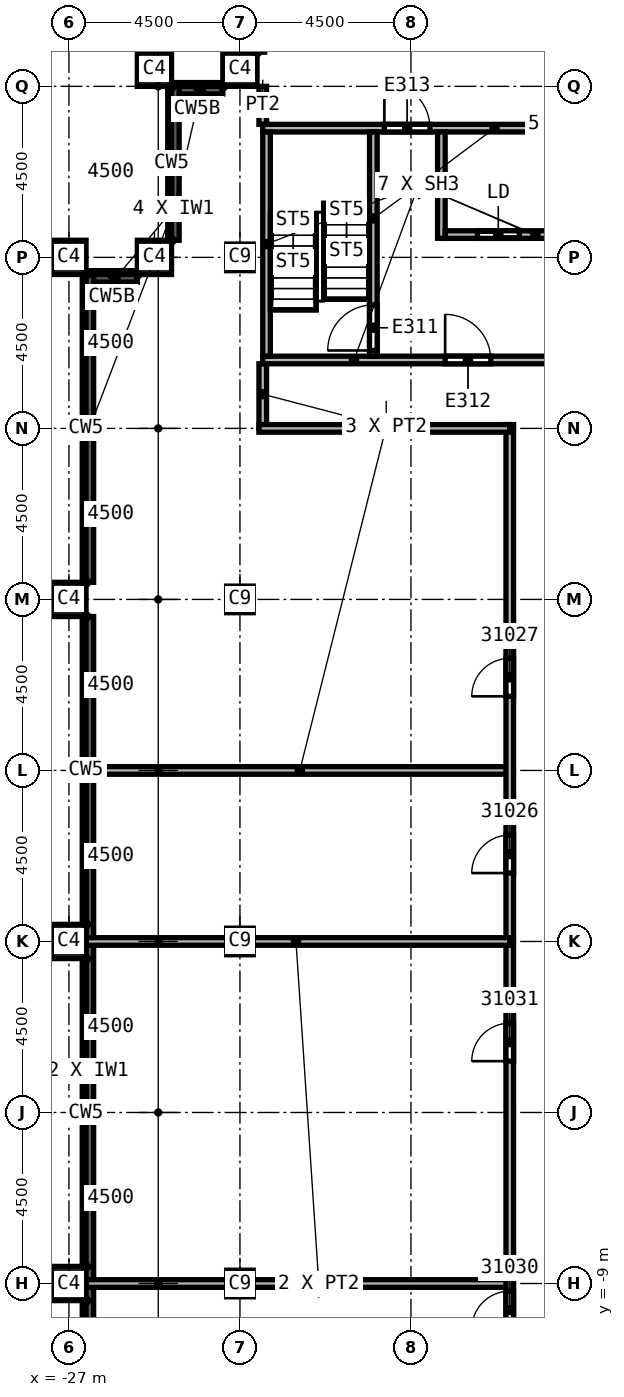
"""IFC4 building model, lengths in metres.
Left out: names, types, materials, properties, quantities, classifications, styles, units other than length and angle.
Written with IfcOpenShell. Run it as: python <this file> out.ifc"""

import sys

from ifc_helpers import new_model, si_unit, direction, frame, frame_2d, origin, origin_2d, place, context, subcontext, project, spatial, rectangle, extrude, element, fill, save


model = new_model("IFC4")
c1 = context("Model", 3, precision=1e-05, world=origin(), true_north=direction((0.0, 1.0)))
c2 = subcontext(c1, "Body", "Model", "MODEL_VIEW")
j1 = project(units=[si_unit("LENGTHUNIT", "METRE"), si_unit("PLANEANGLEUNIT", "RADIAN")], contexts=[c1])
p1 = place(None, origin())
s1 = spatial("IfcSite", under=j1, at=p1, CompositionType="ELEMENT")
p2 = place(p1, origin())
s2 = spatial("IfcBuilding", under=s1, at=p2, CompositionType="ELEMENT")
p3 = place(p2, frame((0.0, 0.0, 350.0)))
s3 = spatial("IfcBuildingStorey", under=s2, at=p3, CompositionType="ELEMENT", Elevation=350.0)
for number, where, z_axis, x_axis in (
    (1, (-22.5, 0.0, 0.0), (0.0, 0.0, 1.0), (1.0, 0.0, 0.0)),
    (2, (-22.5, 9.0, 0.0), (0.0, 0.0, 1.0), (1.0, 0.0, 0.0)),
    (3, (-22.5, 18.0, 0.0), (0.0, 0.0, 1.0), (1.0, 0.0, 0.0)),
    (4, (-22.5, -9.0, 0.0), (0.0, 0.0, 1.0), (1.0, 0.0, 0.0)),
):
    element("IfcColumn", number, at=place(p3, frame(where, z_axis=z_axis, x_axis=x_axis)), inside=s3, PredefinedType="COLUMN", context=c2, shape_type="SweptSolid", body=[
        extrude(rectangle(XDim=0.7, YDim=0.7, at=origin_2d()), origin(), (0.0, 0.0, 1.0), 5.6),
    ])
for number, where, z_axis, x_axis in (
    (5, (-27.0, 0.0, 0.0), (0.0, 0.0, 1.0), (0.0, 1.0, 0.0)),
    (6, (-27.0, 9.0, 0.0), (0.0, 0.0, 1.0), (0.0, 1.0, 0.0)),
    (7, (-27.0, 18.0, 0.0), (0.0, 0.0, 1.0), (0.0, 1.0, 0.0)),
    (8, (-27.0, -9.0, 0.0), (0.0, 0.0, 1.0), (0.0, 1.0, 0.0)),
    (9, (-22.5, 22.95, 0.0), (0.0, 0.0, 1.0), (1.0, 0.0, 0.0)),
    (10, (-24.75, 22.95, 0.0), (0.0, 0.0, 1.0), (1.0, 0.0, 0.0)),
    (11, (-24.75, 18.0, 0.0), (0.0, 0.0, 1.0), (1.0, 0.0, 0.0)),
):
    element("IfcColumn", number, at=place(p3, frame(where, z_axis=z_axis, x_axis=x_axis)), inside=s3, PredefinedType="COLUMN", context=c2, shape_type="SweptSolid", body=[
        extrude(rectangle(XDim=0.9, YDim=0.9, at=origin_2d()), origin(), (0.0, 0.0, 1.0), 5.6),
    ])
p4 = place(p3, frame((-25.2, 17.5, 0.0), z_axis=(0.0, 0.0, 1.0), x_axis=(-1.0, 0.0, 0.0)))
e12 = element("IfcWall", 12, at=p4, inside=s3, PredefinedType="SOLIDWALL", context=c2, shape_type="SweptSolid", body=[
    extrude(rectangle(XDim=1.35, YDim=0.3, at=frame_2d((0.675, 0.0))), origin(), (0.0, 0.0, 1.0), 1.1),
])
p5 = place(p3, frame((-26.5, 17.55, 0.0), z_axis=(0.0, 0.0, 1.0), x_axis=(0.0, -1.0, 0.0)))
e13 = element("IfcWall", 13, at=p5, inside=s3, PredefinedType="SOLIDWALL", context=c2, shape_type="SweptSolid", body=[
    extrude(rectangle(XDim=8.1, YDim=0.3, at=frame_2d((4.05, 0.0))), origin(), (0.0, 0.0, 1.0), 1.1),
])
p6 = place(p3, frame((-26.5, 8.55, 0.0), z_axis=(0.0, 0.0, 1.0), x_axis=(0.0, -1.0, 0.0)))
e14 = element("IfcWall", 14, at=p6, inside=s3, PredefinedType="SOLIDWALL", context=c2, shape_type="SweptSolid", body=[
    extrude(rectangle(XDim=8.5, YDim=0.3, at=frame_2d((4.25, 0.0))), origin(), (0.0, 0.0, 1.0), 1.1),
])
p7 = place(p3, frame((-26.5, -0.05, 0.0), z_axis=(0.0, 0.0, 1.0), x_axis=(0.0, -1.0, 0.0)))
e15 = element("IfcWall", 15, at=p7, inside=s3, PredefinedType="SOLIDWALL", context=c2, shape_type="SweptSolid", body=[
    extrude(rectangle(XDim=8.9, YDim=0.3, at=frame_2d((4.45, 0.0))), origin(), (0.0, 0.0, 1.0), 1.1),
])
p8 = place(p3, frame((-26.5, -9.05, 0.0), z_axis=(0.0, 0.0, 1.0), x_axis=(0.0, -1.0, 0.0)))
e16 = element("IfcWall", 16, at=p8, inside=s3, PredefinedType="SOLIDWALL", context=c2, shape_type="SweptSolid", body=[
    extrude(rectangle(XDim=8.5, YDim=0.3, at=frame_2d((4.25, 0.0))), origin(), (0.0, 0.0, 1.0), 1.1),
])
p9 = place(p3, frame((-22.95, 22.45, 0.0), z_axis=(0.0, 0.0, 1.0), x_axis=(-1.0, 0.0, 0.0)))
e17 = element("IfcWall", 17, at=p9, inside=s3, PredefinedType="SOLIDWALL", context=c2, shape_type="SweptSolid", body=[
    extrude(rectangle(XDim=1.35, YDim=0.3, at=frame_2d((0.675, 0.0))), origin(), (0.0, 0.0, 1.0), 1.1),
])
p10 = place(p3, frame((-24.25, 22.5, 0.0), z_axis=(0.0, 0.0, 1.0), x_axis=(0.0, -1.0, 0.0)))
e18 = element("IfcWall", 18, at=p10, inside=s3, PredefinedType="SOLIDWALL", context=c2, shape_type="SweptSolid", body=[
    extrude(rectangle(XDim=4.05, YDim=0.3, at=frame_2d((2.025, 0.0))), origin(), (0.0, 0.0, 1.0), 1.1),
])
p11 = place(p3, frame((-26.55, -9.0, 0.0), z_axis=(0.0, 0.0, 1.0), x_axis=(1.0, 0.0, 0.0)))
e19 = element("IfcWall", 19, at=p11, inside=s3, PredefinedType="PARTITIONING", context=c2, shape_type="SweptSolid", body=[
    extrude(rectangle(XDim=11.15, YDim=0.2, at=frame_2d((5.575, 0.0))), origin(), (0.0, 0.0, 1.0), 5.6),
])
p12 = place(p3, frame((-26.35, 4.5, 0.0), z_axis=(0.0, 0.0, 1.0), x_axis=(1.0, 0.0, 0.0)))
e20 = element("IfcWall", 20, at=p12, inside=s3, PredefinedType="PARTITIONING", context=c2, shape_type="SweptSolid", body=[
    extrude(rectangle(XDim=10.95, YDim=0.2, at=frame_2d((5.475, 0.0))), origin(), (0.0, 0.0, 1.0), 5.6),
])
p13 = place(p3, frame((-21.9, 13.5, 0.0), z_axis=(0.0, 0.0, 1.0), x_axis=(0.0, 1.0, 0.0)))
e21 = element("IfcWall", 21, at=p13, inside=s3, PredefinedType="PARTITIONING", context=c2, shape_type="SweptSolid", body=[
    extrude(rectangle(XDim=1.7, YDim=0.2, at=frame_2d((0.85, 0.0))), origin(), (0.0, 0.0, 1.0), 5.6),
])
p14 = place(p3, frame((-21.9, 21.5, 0.0), z_axis=(0.0, 0.0, 1.0), x_axis=(0.0, 1.0, 0.0)))
e22 = element("IfcWall", 22, at=p14, inside=s3, PredefinedType="PARTITIONING", context=c2, shape_type="SweptSolid", body=[
    extrude(rectangle(XDim=1.0, YDim=0.2, at=frame_2d((0.5, 0.0))), origin(), (0.0, 0.0, 1.0), 5.6),
])
p15 = place(p3, frame((-15.4, -27.25, 0.0), z_axis=(0.0, 0.0, 1.0), x_axis=(0.0, 1.0, 0.0)))
e23 = element("IfcWall", 23, at=p15, inside=s3, PredefinedType="PARTITIONING", context=c2, shape_type="SweptSolid", body=[
    extrude(rectangle(XDim=40.85, YDim=0.2, at=frame_2d((20.425, 0.0))), origin(), (0.0, 0.0, 1.0), 5.6),
])
p16 = place(p15, frame((29.05, 0.0, 0.0)))
e24 = element("IfcOpeningElement", 24, at=p16, cuts=e23, PredefinedType="OPENING", context=c2, shape_type="SweptSolid", body=[
    extrude(rectangle(XDim=1.0, YDim=2.1, at=frame_2d((0.5, 1.05))), frame((0.0, 0.1, 0.0), z_axis=(0.0, -1.0, 0.0), x_axis=(1.0, 0.0, 0.0)), (0.0, 0.0, 1.0), 0.2),
])
p17 = place(p15, frame((33.7, 0.0, 0.0)))
e25 = element("IfcOpeningElement", 25, at=p17, cuts=e23, PredefinedType="OPENING", context=c2, shape_type="SweptSolid", body=[
    extrude(rectangle(XDim=1.0, YDim=2.1, at=frame_2d((0.5, 1.05))), frame((0.0, 0.1, 0.0), z_axis=(0.0, -1.0, 0.0), x_axis=(1.0, 0.0, 0.0)), (0.0, 0.0, 1.0), 0.2),
])
p18 = place(p15, frame((1.3, 0.0, 0.0)))
e26 = element("IfcOpeningElement", 26, at=p18, cuts=e23, PredefinedType="OPENING", context=c2, shape_type="SweptSolid", body=[
    extrude(rectangle(XDim=1.0, YDim=2.1, at=frame_2d((0.5, 1.05))), frame((0.0, 0.1, 0.0), z_axis=(0.0, -1.0, 0.0), x_axis=(1.0, 0.0, 0.0)), (0.0, 0.0, 1.0), 0.2),
])
p19 = place(p15, frame((7.15, 0.0, 0.0)))
e27 = element("IfcOpeningElement", 27, at=p19, cuts=e23, PredefinedType="OPENING", context=c2, shape_type="SweptSolid", body=[
    extrude(rectangle(XDim=1.0, YDim=2.1, at=frame_2d((0.5, 1.05))), frame((0.0, 0.1, 0.0), z_axis=(0.0, -1.0, 0.0), x_axis=(1.0, 0.0, 0.0)), (0.0, 0.0, 1.0), 0.2),
])
p20 = place(p15, frame((17.05, 0.0, 0.0)))
e28 = element("IfcOpeningElement", 28, at=p20, cuts=e23, PredefinedType="OPENING", context=c2, shape_type="SweptSolid", body=[
    extrude(rectangle(XDim=1.0, YDim=2.1, at=frame_2d((0.5, 1.05))), frame((0.0, 0.1, 0.0), z_axis=(0.0, -1.0, 0.0), x_axis=(1.0, 0.0, 0.0)), (0.0, 0.0, 1.0), 0.2),
])
p21 = place(p15, frame((24.1, 0.0, 0.0)))
e29 = element("IfcOpeningElement", 29, at=p21, cuts=e23, PredefinedType="OPENING", context=c2, shape_type="SweptSolid", body=[
    extrude(rectangle(XDim=1.0, YDim=2.1, at=frame_2d((0.5, 1.05))), frame((0.0, 0.1, 0.0), z_axis=(0.0, -1.0, 0.0), x_axis=(1.0, 0.0, 0.0)), (0.0, 0.0, 1.0), 0.2),
])
p22 = place(p3, frame((-15.4, 0.0, 0.0), z_axis=(0.0, 0.0, 1.0), x_axis=(-1.0, 0.0, 0.0)))
e30 = element("IfcWall", 30, at=p22, inside=s3, PredefinedType="PARTITIONING", context=c2, shape_type="SweptSolid", body=[
    extrude(rectangle(XDim=11.15, YDim=0.2, at=frame_2d((5.575, 0.0))), origin(), (0.0, 0.0, 1.0), 5.6),
])
p23 = place(p3, frame((-15.4, 13.5, 0.0), z_axis=(0.0, 0.0, 1.0), x_axis=(-1.0, 0.0, 0.0)))
e31 = element("IfcWall", 31, at=p23, inside=s3, PredefinedType="PARTITIONING", context=c2, shape_type="SweptSolid", body=[
    extrude(rectangle(XDim=6.6, YDim=0.2, at=frame_2d((3.3, 0.0))), origin(), (0.0, 0.0, 1.0), 5.6),
])
p24 = place(p3, frame((-21.9, 15.3, 0.0), z_axis=(0.0, 0.0, 1.0), x_axis=(1.0, 0.0, 0.0)))
e32 = element("IfcWall", 32, at=p24, inside=s3, PredefinedType="SOLIDWALL", context=c2, shape_type="SweptSolid", body=[
    extrude(rectangle(XDim=8.275, YDim=0.2, at=frame_2d((4.137, 0.0))), origin(), (0.0, 0.0, 1.0), 5.6),
])
p25 = place(p24, frame((4.8, 0.0, 0.0)))
e33 = element("IfcOpeningElement", 33, at=p25, cuts=e32, PredefinedType="OPENING", context=c2, shape_type="SweptSolid", body=[
    extrude(rectangle(XDim=1.2, YDim=2.1, at=frame_2d((0.6, 1.05))), frame((0.0, 0.1, 0.0), z_axis=(0.0, -1.0, 0.0), x_axis=(1.0, 0.0, 0.0)), (0.0, 0.0, 1.0), 0.2),
])
p26 = place(p3, frame((-21.9, 21.4, 0.0), z_axis=(0.0, 0.0, 1.0), x_axis=(1.0, 0.0, 0.0)))
e34 = element("IfcWall", 34, at=p26, inside=s3, PredefinedType="SOLIDWALL", context=c2, shape_type="SweptSolid", body=[
    extrude(rectangle(XDim=7.8, YDim=0.2, at=frame_2d((3.9, 0.0))), origin(), (0.0, 0.0, 1.0), 5.6),
])
p27 = place(p26, frame((3.2, 0.0, 0.0)))
e35 = element("IfcOpeningElement", 35, at=p27, cuts=e34, PredefinedType="OPENING", context=c2, shape_type="SweptSolid", body=[
    extrude(rectangle(XDim=1.2, YDim=2.1, at=frame_2d((0.6, 1.05))), frame((0.0, 0.1, 0.0), z_axis=(0.0, -1.0, 0.0), x_axis=(1.0, 0.0, 0.0)), (0.0, 0.0, 1.0), 0.2),
])
p28 = place(p3, frame((-21.8, 15.4, 0.0), z_axis=(0.0, 0.0, 1.0), x_axis=(0.0, 1.0, 0.0)))
e36 = element("IfcWall", 36, at=p28, inside=s3, PredefinedType="SOLIDWALL", context=c2, shape_type="SweptSolid", body=[
    extrude(rectangle(XDim=5.9, YDim=0.2, at=frame_2d((2.95, 0.0))), origin(), (0.0, 0.0, 1.0), 5.6),
])
p29 = place(p3, frame((-18.99, 15.4, 0.0), z_axis=(0.0, 0.0, 1.0), x_axis=(0.0, 1.0, 0.0)))
e37 = element("IfcWall", 37, at=p29, inside=s3, PredefinedType="SOLIDWALL", context=c2, shape_type="SweptSolid", body=[
    extrude(rectangle(XDim=5.9, YDim=0.2, at=frame_2d((2.95, 0.0))), origin(), (0.0, 0.0, 1.0), 5.6),
])
p30 = place(p29, frame((0.15, 0.0, 0.0)))
e38 = element("IfcOpeningElement", 38, at=p30, cuts=e37, PredefinedType="OPENING", context=c2, shape_type="SweptSolid", body=[
    extrude(rectangle(XDim=1.2, YDim=2.1, at=frame_2d((0.6, 1.05))), frame((0.0, 0.1, 0.0), z_axis=(0.0, -1.0, 0.0), x_axis=(1.0, 0.0, 0.0)), (0.0, 0.0, 1.0), 0.2),
])
p31 = place(p3, frame((-17.2, 18.5, 0.0), z_axis=(0.0, 0.0, 1.0), x_axis=(0.0, 1.0, 0.0)))
e39 = element("IfcWall", 39, at=p31, inside=s3, PredefinedType="SOLIDWALL", context=c2, shape_type="SweptSolid", body=[
    extrude(rectangle(XDim=2.8, YDim=0.2, at=frame_2d((1.4, 0.0))), origin(), (0.0, 0.0, 1.0), 5.6),
])
p32 = place(p3, frame((-17.1, 18.6, 0.0), z_axis=(0.0, 0.0, 1.0), x_axis=(1.0, 0.0, 0.0)))
e40 = element("IfcWall", 40, at=p32, inside=s3, PredefinedType="SOLIDWALL", context=c2, shape_type="SweptSolid", body=[
    extrude(rectangle(XDim=2.8, YDim=0.2, at=frame_2d((1.4, 0.0))), origin(), (0.0, 0.0, 1.0), 5.6),
])
p33 = place(p32, frame((0.85, 0.0, 0.0)))
e41 = element("IfcOpeningElement", 41, at=p33, cuts=e40, PredefinedType="OPENING", context=c2, shape_type="SweptSolid", body=[
    extrude(rectangle(XDim=1.1, YDim=2.1, at=frame_2d((0.55, 1.05))), frame((0.0, 0.1, 0.0), z_axis=(0.0, -1.0, 0.0), x_axis=(1.0, 0.0, 0.0)), (0.0, 0.0, 1.0), 0.2),
])
p34 = place(p16, origin())
e42 = element("IfcDoor", 42, at=p34, inside=s3, OperationType="SINGLE_SWING_LEFT", PredefinedType="DOOR", context=c2, shape_type="SweptSolid", body=[
    extrude(rectangle(XDim=1.0, YDim=2.1, at=frame_2d((0.5, 1.05))), frame((0.0, 0.025, 0.0), z_axis=(0.0, -1.0, 0.0), x_axis=(1.0, 0.0, 0.0)), (0.0, 0.0, 1.0), 0.05),
])
fill(e24, e42)
p35 = place(p17, origin())
e43 = element("IfcDoor", 43, at=p35, inside=s3, OperationType="SINGLE_SWING_RIGHT", PredefinedType="DOOR", context=c2, shape_type="SweptSolid", body=[
    extrude(rectangle(XDim=1.0, YDim=2.1, at=frame_2d((0.5, 1.05))), frame((0.0, 0.025, 0.0), z_axis=(0.0, -1.0, 0.0), x_axis=(1.0, 0.0, 0.0)), (0.0, 0.0, 1.0), 0.05),
])
fill(e25, e43)
p36 = place(p20, origin())
e44 = element("IfcDoor", 44, at=p36, inside=s3, OperationType="SINGLE_SWING_LEFT", PredefinedType="DOOR", context=c2, shape_type="SweptSolid", body=[
    extrude(rectangle(XDim=1.0, YDim=2.1, at=frame_2d((0.5, 1.05))), frame((0.0, 0.025, 0.0), z_axis=(0.0, -1.0, 0.0), x_axis=(1.0, 0.0, 0.0)), (0.0, 0.0, 1.0), 0.05),
])
fill(e28, e44)
p37 = place(p21, origin())
e45 = element("IfcDoor", 45, at=p37, inside=s3, OperationType="SINGLE_SWING_RIGHT", PredefinedType="DOOR", context=c2, shape_type="SweptSolid", body=[
    extrude(rectangle(XDim=1.0, YDim=2.1, at=frame_2d((0.5, 1.05))), frame((0.0, 0.025, 0.0), z_axis=(0.0, -1.0, 0.0), x_axis=(1.0, 0.0, 0.0)), (0.0, 0.0, 1.0), 0.05),
])
fill(e29, e45)
p38 = place(p30, origin())
e46 = element("IfcDoor", 46, at=p38, inside=s3, OperationType="SINGLE_SWING_LEFT", PredefinedType="DOOR", context=c2, shape_type="SweptSolid", body=[
    extrude(rectangle(XDim=1.2, YDim=2.1, at=frame_2d((0.6, 1.05))), frame((0.0, 0.025, 0.0), z_axis=(0.0, -1.0, 0.0), x_axis=(1.0, 0.0, 0.0)), (0.0, 0.0, 1.0), 0.05),
])
fill(e38, e46)
p39 = place(p33, origin())
e47 = element("IfcDoor", 47, at=p39, inside=s3, OperationType="SLIDING_TO_LEFT", PredefinedType="DOOR", context=c2, shape_type="SweptSolid", body=[
    extrude(rectangle(XDim=1.1, YDim=2.1, at=frame_2d((0.55, 1.05))), frame((0.0, 0.025, 0.0), z_axis=(0.0, -1.0, 0.0), x_axis=(1.0, 0.0, 0.0)), (0.0, 0.0, 1.0), 0.05),
])
fill(e41, e47)
p40 = place(p25, origin())
e48 = element("IfcDoor", 48, at=p40, inside=s3, OperationType="SINGLE_SWING_RIGHT", PredefinedType="DOOR", context=c2, shape_type="SweptSolid", body=[
    extrude(rectangle(XDim=1.2, YDim=2.1, at=frame_2d((0.6, 1.05))), frame((0.0, 0.025, 0.0), z_axis=(0.0, -1.0, 0.0), x_axis=(1.0, 0.0, 0.0)), (0.0, 0.0, 1.0), 0.05),
])
fill(e33, e48)
p41 = place(p27, origin())
e49 = element("IfcDoor", 49, at=p41, inside=s3, OperationType="SINGLE_SWING_LEFT", PredefinedType="DOOR", context=c2, shape_type="SweptSolid", body=[
    extrude(rectangle(XDim=1.2, YDim=2.1, at=frame_2d((0.6, 1.05))), frame((0.0, 0.025, 0.0), z_axis=(0.0, -1.0, 0.0), x_axis=(1.0, 0.0, 0.0)), (0.0, 0.0, 1.0), 0.05),
])
fill(e35, e49)
save(model, sys.argv[1])
